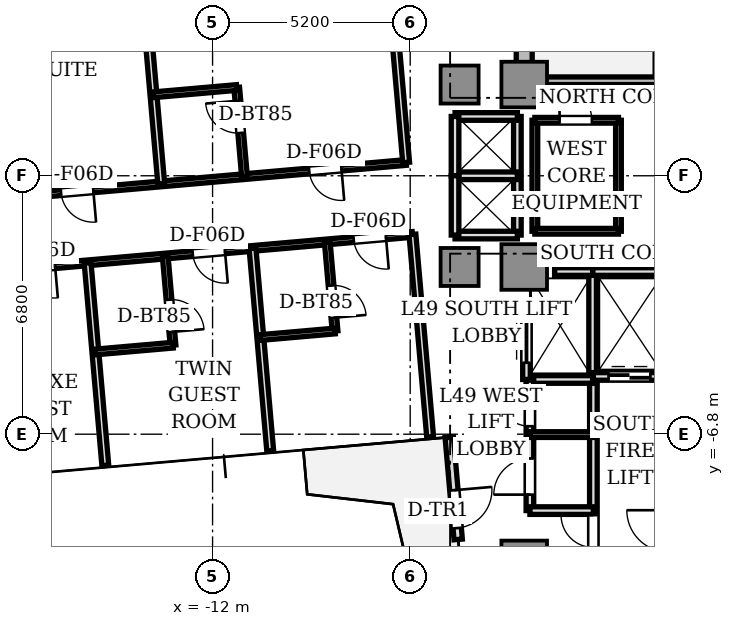
"""IFC4 building model, lengths in metres.
Left out: names, types, materials, properties, quantities, classifications, styles, units other than length and angle.
Written with IfcOpenShell. Run it as: python <this file> out.ifc"""

import sys

from ifc_helpers import new_model, si_unit, direction, frame, frame_2d, origin, origin_2d, place, context, subcontext, project, spatial, rectangle, extrude, source, transform, mapped, element, fill, save


model = new_model("IFC4")
c1 = context("Model", 3, precision=1e-05, world=origin(), true_north=direction((0.0, 1.0)))
c2 = subcontext(c1, "Body", "Model", "MODEL_VIEW")
j1 = project(units=[si_unit("LENGTHUNIT", "METRE"), si_unit("PLANEANGLEUNIT", "RADIAN")], contexts=[c1])
p1 = place(None, origin())
s1 = spatial("IfcSite", under=j1, at=p1, CompositionType="ELEMENT")
p2 = place(p1, origin())
s2 = spatial("IfcBuilding", under=s1, at=p2, CompositionType="ELEMENT")
p3 = place(p2, frame((0.0, 0.0, 178.55)))
s3 = spatial("IfcBuildingStorey", under=s2, at=p3, CompositionType="ELEMENT", Elevation=178.55)
p4 = place(p3, frame((-3.8, 2.85, 0.0), z_axis=(0.0, 0.0, 1.0), x_axis=(0.0, 1.0, 0.0)))
e1 = element("IfcWall", 1, at=p4, inside=s3, PredefinedType="SHEAR", context=c2, shape_type="SweptSolid", body=[
    extrude(rectangle(XDim=6.9, YDim=0.42, at=frame_2d((3.45, 0.0))), origin(), (0.0, 0.0, 1.0), 3.11),
])
m1 = source(origin(), c2, "Body", "SweptSolid", [
    extrude(rectangle(XDim=1.2, YDim=1.2, at=origin_2d()), origin(), (0.0, 0.0, 1.0), 3.11),
])
for number, where, z_axis, x_axis in (
    (2, (-3.8, 2.4, 0.0), (0.0, 0.0, 1.0), (1.0, 0.0, 0.0)),
    (3, (-3.8, -2.4, 0.0), (0.0, 0.0, 1.0), (1.0, 0.0, 0.0)),
    (4, (-3.8, -10.2, 0.0), (0.0, 0.0, 1.0), (1.0, 0.0, 0.0)),
):
    element("IfcColumn", number, at=place(p3, frame(where, z_axis=z_axis, x_axis=x_axis)), inside=s3, PredefinedType="COLUMN", context=c2, shape_type="MappedRepresentation", body=[
        mapped(m1, transform((0.0, 0.0, 0.0), scale=1.0)),
    ])
m2 = source(origin(), c2, "Body", "SweptSolid", [
    extrude(rectangle(XDim=1.0, YDim=1.0, at=origin_2d()), origin(), (0.0, 0.0, 1.0), 3.11),
])
for number, where, z_axis, x_axis in (
    (5, (-5.5, 2.4, 0.0), (0.0, 0.0, 1.0), (1.0, 0.0, 0.0)),
    (6, (-5.5, -2.4, 0.0), (0.0, 0.0, 1.0), (1.0, 0.0, 0.0)),
):
    element("IfcColumn", number, at=place(p3, frame(where, z_axis=z_axis, x_axis=x_axis)), inside=s3, PredefinedType="COLUMN", context=c2, shape_type="MappedRepresentation", body=[
        mapped(m2, transform((0.0, 0.0, 0.0), scale=1.0)),
    ])
p5 = place(p3, frame((-5.772, -6.879, 0.0), z_axis=(0.0, 0.0, 1.0), x_axis=(0.087168071984, -0.996193619346, 0.0)))
e7 = element("IfcWall", 7, at=p5, inside=s3, PredefinedType="STANDARD", context=c2, shape_type="SweptSolid", body=[
    extrude(rectangle(XDim=2.7, YDim=0.22, at=frame_2d((1.35, 0.0))), origin(), (0.0, 0.0, 1.0), 3.11),
])
p6 = place(p5, frame((1.4, 0.0, 0.0)))
e8 = element("IfcOpeningElement", 8, at=p6, cuts=e7, PredefinedType="OPENING", context=c2, shape_type="SweptSolid", body=[
    extrude(rectangle(XDim=1.0, YDim=2.2, at=frame_2d((0.5, 1.1))), frame((0.0, 0.12, 0.0), z_axis=(0.0, -1.0, 0.0), x_axis=(1.0, 0.0, 0.0)), (0.0, 0.0, 1.0), 0.24),
])
p7 = place(p3, frame((-3.72, 2.5, 0.0), z_axis=(0.0, 0.0, 1.0), x_axis=(1.0, 0.0, 0.0)))
e9 = element("IfcWall", 9, at=p7, inside=s3, PredefinedType="SOLIDWALL", context=c2, shape_type="SweptSolid", body=[
    extrude(rectangle(XDim=3.72, YDim=0.2, at=frame_2d((1.86, 0.0))), origin(), (0.0, 0.0, 1.0), 3.11),
])
p8 = place(p3, frame((-1.98, -9.98, 0.0), z_axis=(0.0, 0.0, 1.0), x_axis=(0.0, 1.0, 0.0)))
e10 = element("IfcWall", 10, at=p8, inside=s3, PredefinedType="SOLIDWALL", context=c2, shape_type="SweptSolid", body=[
    extrude(rectangle(XDim=4.66, YDim=0.2, at=frame_2d((2.33, 0.0))), origin(), (0.0, 0.0, 1.0), 2.66),
])
p9 = place(p8, frame((0.2, 0.0, 0.0)))
e11 = element("IfcOpeningElement", 11, at=p9, cuts=e10, PredefinedType="OPENING", context=c2, shape_type="SweptSolid", body=[
    extrude(rectangle(XDim=0.85, YDim=2.1, at=frame_2d((0.425, 1.05))), frame((0.0, 0.11, 0.0), z_axis=(0.0, -1.0, 0.0), x_axis=(1.0, 0.0, 0.0)), (0.0, 0.0, 1.0), 0.22),
])
p10 = place(p3, frame((-2.0, -5.28, 0.0), z_axis=(0.0, 0.0, 1.0), x_axis=(0.0, 1.0, 0.0)))
e12 = element("IfcWall", 12, at=p10, inside=s3, PredefinedType="SOLIDWALL", context=c2, shape_type="SweptSolid", body=[
    extrude(rectangle(XDim=2.78, YDim=0.2, at=frame_2d((1.39, 0.0))), origin(), (0.0, 0.0, 1.0), 2.66),
])
p11 = place(p3, frame((-2.0, -2.52, 0.0), z_axis=(0.0, 0.0, 1.0), x_axis=(1.0, 0.0, 0.0)))
e13 = element("IfcWall", 13, at=p11, inside=s3, PredefinedType="SOLIDWALL", context=c2, shape_type="SweptSolid", body=[
    extrude(rectangle(XDim=1.95, YDim=0.2, at=frame_2d((0.975, 0.0))), origin(), (0.0, 0.0, 1.0), 2.66),
])
p12 = place(p3, frame((-1.98, -5.28, 0.0), z_axis=(0.0, 0.0, 1.0), x_axis=(1.0, 0.0, 0.0)))
e14 = element("IfcWall", 14, at=p12, inside=s3, PredefinedType="SOLIDWALL", context=c2, shape_type="SweptSolid", body=[
    extrude(rectangle(XDim=1.93, YDim=0.2, at=frame_2d((0.965, 0.0))), origin(), (0.0, 0.0, 1.0), 2.66),
])
p13 = place(p12, frame((0.4, 0.0, 0.0)))
e15 = element("IfcOpeningElement", 15, at=p13, cuts=e14, PredefinedType="OPENING", context=c2, shape_type="SweptSolid", body=[
    extrude(rectangle(XDim=1.1, YDim=2.2, at=frame_2d((0.55, 1.1))), frame((0.0, 0.11, 0.0), z_axis=(0.0, -1.0, 0.0), x_axis=(1.0, 0.0, 0.0)), (0.0, 0.0, 1.0), 0.22),
])
p14 = place(p3, frame((-3.0, -2.52, 0.0), z_axis=(0.0, 0.0, 1.0), x_axis=(1.0, 0.0, 0.0)))
e16 = element("IfcWall", 16, at=p14, inside=s3, PredefinedType="SOLIDWALL", context=c2, shape_type="SweptSolid", body=[
    extrude(rectangle(XDim=1.0, YDim=0.2, at=frame_2d((0.5, 0.0))), origin(), (0.0, 0.0, 1.0), 2.66),
])
p15 = place(p3, frame((-3.74, -5.36, 0.0), z_axis=(0.0, 0.0, 1.0), x_axis=(1.0, 0.0, 0.0)))
e17 = element("IfcWall", 17, at=p15, inside=s3, PredefinedType="SOLIDWALL", context=c2, shape_type="SweptSolid", body=[
    extrude(rectangle(XDim=1.74, YDim=0.2, at=frame_2d((0.87, 0.0))), origin(), (0.0, 0.0, 1.0), 2.66),
])
p16 = place(p3, frame((-3.74, -5.36, 0.0), z_axis=(0.0, 0.0, 1.0), x_axis=(0.0, 1.0, 0.0)))
e18 = element("IfcWall", 18, at=p16, inside=s3, PredefinedType="SOLIDWALL", context=c2, shape_type="SweptSolid", body=[
    extrude(rectangle(XDim=2.08, YDim=0.2, at=frame_2d((1.04, 0.0))), origin(), (0.0, 0.0, 1.0), 2.66),
])
p17 = place(p16, frame((0.44, 0.0, 0.0)))
e19 = element("IfcOpeningElement", 19, at=p17, cuts=e18, PredefinedType="OPENING", context=c2, shape_type="SweptSolid", body=[
    extrude(rectangle(XDim=1.2, YDim=2.2, at=frame_2d((0.6, 1.1))), frame((0.0, 0.11, 0.0), z_axis=(0.0, -1.0, 0.0), x_axis=(1.0, 0.0, 0.0)), (0.0, 0.0, 1.0), 0.22),
])
p18 = place(p3, frame((-3.98, -1.56, 0.0), z_axis=(0.0, 0.0, 1.0), x_axis=(0.0, 1.0, 0.0)))
e20 = element("IfcWall", 20, at=p18, inside=s3, PredefinedType="SOLIDWALL", context=c2, shape_type="SweptSolid", body=[
    extrude(rectangle(XDim=3.12, YDim=0.2, at=frame_2d((1.56, 0.0))), origin(), (0.0, 0.0, 1.0), 2.28),
])
for number, where, z_axis, x_axis in (
    (21, (-5.62, 1.56, 0.0), (0.0, 0.0, 1.0), (1.0, 0.0, 0.0)),
    (22, (-5.62, -1.56, 0.0), (0.0, 0.0, 1.0), (1.0, 0.0, 0.0)),
    (23, (-5.62, 0.0, 0.0), (0.0, 0.0, 1.0), (1.0, 0.0, 0.0)),
):
    element("IfcWall", number, at=place(p3, frame(where, z_axis=z_axis, x_axis=x_axis)), inside=s3, PredefinedType="SOLIDWALL", context=c2, shape_type="SweptSolid", body=[
        extrude(rectangle(XDim=1.64, YDim=0.2, at=frame_2d((0.82, 0.0))), origin(), (0.0, 0.0, 1.0), 2.66),
    ])
for number, where, z_axis, x_axis in (
    (24, (-5.62, 0.0, 0.0), (0.0, 0.0, 1.0), (0.0, 1.0, 0.0)),
    (25, (-5.62, -1.56, 0.0), (0.0, 0.0, 1.0), (0.0, 1.0, 0.0)),
):
    element("IfcWall", number, at=place(p3, frame(where, z_axis=z_axis, x_axis=x_axis)), inside=s3, PredefinedType="SOLIDWALL", context=c2, shape_type="SweptSolid", body=[
        extrude(rectangle(XDim=1.56, YDim=0.2, at=frame_2d((0.78, 0.0))), origin(), (0.0, 0.0, 1.0), 2.66),
    ])
p19 = place(p3, frame((-3.65, -8.81, 0.0), z_axis=(0.0, 0.0, 1.0), x_axis=(0.0, 1.0, 0.0)))
e26 = element("IfcWall", 26, at=p19, inside=s3, PredefinedType="SOLIDWALL", context=c2, shape_type="SweptSolid", body=[
    extrude(rectangle(XDim=3.43, YDim=0.2, at=frame_2d((1.715, 0.0))), origin(), (0.0, 0.0, 1.0), 2.66),
])
p20 = place(p19, frame((0.42, 0.0, 0.0)))
e27 = element("IfcOpeningElement", 27, at=p20, cuts=e26, PredefinedType="OPENING", context=c2, shape_type="SweptSolid", body=[
    extrude(rectangle(XDim=0.95, YDim=2.15, at=frame_2d((0.475, 1.075))), frame((0.0, 0.11, 0.0), z_axis=(0.0, -1.0, 0.0), x_axis=(1.0, 0.0, 0.0)), (0.0, 0.0, 1.0), 0.22),
])
p21 = place(p19, frame((2.22, 0.0, 0.0)))
e28 = element("IfcOpeningElement", 28, at=p21, cuts=e26, PredefinedType="OPENING", context=c2, shape_type="SweptSolid", body=[
    extrude(rectangle(XDim=0.85, YDim=2.1, at=frame_2d((0.425, 1.05))), frame((0.0, 0.11, 0.0), z_axis=(0.0, -1.0, 0.0), x_axis=(1.0, 0.0, 0.0)), (0.0, 0.0, 1.0), 0.22),
])
p22 = place(p3, frame((-3.65, -8.81, 0.0), z_axis=(0.0, 0.0, 1.0), x_axis=(1.0, 0.0, 0.0)))
e29 = element("IfcWall", 29, at=p22, inside=s3, PredefinedType="SOLIDWALL", context=c2, shape_type="SweptSolid", body=[
    extrude(rectangle(XDim=1.67, YDim=0.2, at=frame_2d((0.835, 0.0))), origin(), (0.0, 0.0, 1.0), 2.66),
])
p23 = place(p3, frame((-3.65, -6.81, 0.0), z_axis=(0.0, 0.0, 1.0), x_axis=(1.0, 0.0, 0.0)))
e30 = element("IfcWall", 30, at=p23, inside=s3, PredefinedType="PARTITIONING", context=c2, shape_type="SweptSolid", body=[
    extrude(rectangle(XDim=1.67, YDim=0.15, at=frame_2d((0.835, 0.0))), origin(), (0.0, 0.0, 1.0), 2.66),
])
p24 = place(p3, frame((-1.32, -1.46, 0.0), z_axis=(0.0, 0.0, 1.0), x_axis=(0.0, 1.0, 0.0)))
e31 = element("IfcWall", 31, at=p24, inside=s3, PredefinedType="PARTITIONING", context=c2, shape_type="SweptSolid", body=[
    extrude(rectangle(XDim=2.92, YDim=0.15, at=frame_2d((1.46, 0.0))), origin(), (0.0, 0.0, 1.0), 2.66),
])
p25 = place(p3, frame((-3.52, -1.46, 0.0), z_axis=(0.0, 0.0, 1.0), x_axis=(0.0, 1.0, 0.0)))
e32 = element("IfcWall", 32, at=p25, inside=s3, PredefinedType="PARTITIONING", context=c2, shape_type="SweptSolid", body=[
    extrude(rectangle(XDim=2.92, YDim=0.15, at=frame_2d((1.46, 0.0))), origin(), (0.0, 0.0, 1.0), 2.28),
])
p26 = place(p3, frame((-3.52, 1.46, 0.0), z_axis=(0.0, 0.0, 1.0), x_axis=(1.0, 0.0, 0.0)))
e33 = element("IfcWall", 33, at=p26, inside=s3, PredefinedType="PARTITIONING", context=c2, shape_type="SweptSolid", body=[
    extrude(rectangle(XDim=2.2, YDim=0.15, at=frame_2d((1.1, 0.0))), origin(), (0.0, 0.0, 1.0), 2.66),
])
p27 = place(p26, frame((0.65, 0.0, 0.0)))
e34 = element("IfcOpeningElement", 34, at=p27, cuts=e33, PredefinedType="OPENING", context=c2, shape_type="SweptSolid", body=[
    extrude(rectangle(XDim=0.85, YDim=2.1, at=frame_2d((0.425, 1.05))), frame((0.0, 0.085, 0.0), z_axis=(0.0, -1.0, 0.0), x_axis=(1.0, 0.0, 0.0)), (0.0, 0.0, 1.0), 0.17),
])
p28 = place(p3, frame((-3.52, -1.46, 0.0), z_axis=(0.0, 0.0, 1.0), x_axis=(1.0, 0.0, 0.0)))
e35 = element("IfcWall", 35, at=p28, inside=s3, PredefinedType="PARTITIONING", context=c2, shape_type="SweptSolid", body=[
    extrude(rectangle(XDim=2.2, YDim=0.15, at=frame_2d((1.1, 0.0))), origin(), (0.0, 0.0, 1.0), 2.66),
])
p29 = place(p3, frame((-6.741, -1.543, 0.0), z_axis=(0.0, 0.0, 1.0), x_axis=(-0.996195062465, -0.087151577845, 0.0)))
e36 = element("IfcWall", 36, at=p29, inside=s3, PredefinedType="PARTITIONING", context=c2, shape_type="SweptSolid", body=[
    extrude(rectangle(XDim=13.2, YDim=0.15, at=frame_2d((6.6, 0.0))), origin(), (0.0, 0.0, 1.0), 2.66),
])
p30 = place(p29, frame((0.7, 0.0, 0.0)))
e37 = element("IfcOpeningElement", 37, at=p30, cuts=e36, PredefinedType="OPENING", context=c2, shape_type="SweptSolid", body=[
    extrude(rectangle(XDim=0.85, YDim=2.1, at=frame_2d((0.425, 1.05))), frame((0.0, 0.085, 0.0), z_axis=(0.0, -1.0, 0.0), x_axis=(1.0, 0.0, 0.0)), (0.0, 0.0, 1.0), 0.17),
])
p31 = place(p29, frame((4.952, 0.0, 0.0)))
e38 = element("IfcOpeningElement", 38, at=p31, cuts=e36, PredefinedType="OPENING", context=c2, shape_type="SweptSolid", body=[
    extrude(rectangle(XDim=0.85, YDim=2.1, at=frame_2d((0.425, 1.05))), frame((0.0, 0.085, 0.0), z_axis=(0.0, -1.0, 0.0), x_axis=(1.0, 0.0, 0.0)), (0.0, 0.0, 1.0), 0.17),
])
p32 = place(p29, frame((9.44, 0.0, 0.0)))
e39 = element("IfcOpeningElement", 39, at=p32, cuts=e36, PredefinedType="OPENING", context=c2, shape_type="SweptSolid", body=[
    extrude(rectangle(XDim=0.85, YDim=2.1, at=frame_2d((0.425, 1.05))), frame((0.0, 0.085, 0.0), z_axis=(0.0, -1.0, 0.0), x_axis=(1.0, 0.0, 0.0)), (0.0, 0.0, 1.0), 0.17),
])
p33 = place(p3, frame((-6.907, 0.349, 0.0), z_axis=(0.0, 0.0, 1.0), x_axis=(-0.996195062465, -0.087151577845, 0.0)))
e40 = element("IfcWall", 40, at=p33, inside=s3, PredefinedType="PARTITIONING", context=c2, shape_type="SweptSolid", body=[
    extrude(rectangle(XDim=13.2, YDim=0.15, at=frame_2d((6.6, 0.0))), origin(), (0.0, 0.0, 1.0), 2.66),
])
p34 = place(p33, frame((1.71, 0.0, 0.0)))
e41 = element("IfcOpeningElement", 41, at=p34, cuts=e40, PredefinedType="OPENING", context=c2, shape_type="SweptSolid", body=[
    extrude(rectangle(XDim=0.85, YDim=2.1, at=frame_2d((0.425, 1.05))), frame((0.0, 0.085, 0.0), z_axis=(0.0, -1.0, 0.0), x_axis=(1.0, 0.0, 0.0)), (0.0, 0.0, 1.0), 0.17),
])
p35 = place(p33, frame((8.264, 0.0, 0.0)))
e42 = element("IfcOpeningElement", 42, at=p35, cuts=e40, PredefinedType="OPENING", context=c2, shape_type="SweptSolid", body=[
    extrude(rectangle(XDim=0.85, YDim=2.1, at=frame_2d((0.425, 1.05))), frame((0.0, 0.085, 0.0), z_axis=(0.0, -1.0, 0.0), x_axis=(1.0, 0.0, 0.0)), (0.0, 0.0, 1.0), 0.17),
])
for number, where, z_axis, x_axis in (
    (43, (-6.741, -1.543, 0.0), (0.0, 0.0, 1.0), (0.087, -0.996, 0.0)),
    (44, (-7.373, 5.679, 0.0), (0.0, 0.0, 1.0), (0.087, -0.996, 0.0)),
    (45, (-10.949, -1.912, 0.0), (0.0, 0.0, 1.0), (0.087, -0.996, 0.0)),
):
    element("IfcWall", number, at=place(p3, frame(where, z_axis=z_axis, x_axis=x_axis)), inside=s3, PredefinedType="PARTITIONING", context=c2, shape_type="SweptSolid", body=[
        extrude(rectangle(XDim=5.35, YDim=0.18, at=frame_2d((2.675, 0.0))), origin(), (0.0, 0.0, 1.0), 2.66),
    ])
p36 = place(p3, frame((-8.983, -1.74, 0.0), z_axis=(0.0, 0.0, 1.0), x_axis=(0.087224846905, -0.996188649846, 0.0)))
e46 = element("IfcWall", 46, at=p36, inside=s3, PredefinedType="PARTITIONING", context=c2, shape_type="SweptSolid", body=[
    extrude(rectangle(XDim=2.354, YDim=0.15, at=frame_2d((1.177, 0.0))), origin(), (0.0, 0.0, 1.0), 2.66),
])
p37 = place(p36, frame((1.154, 0.0, 0.0)))
e47 = element("IfcOpeningElement", 47, at=p37, cuts=e46, PredefinedType="OPENING", context=c2, shape_type="SweptSolid", body=[
    extrude(rectangle(XDim=0.85, YDim=2.1, at=frame_2d((0.425, 1.05))), frame((0.0, 0.085, 0.0), z_axis=(0.0, -1.0, 0.0), x_axis=(1.0, 0.0, 0.0)), (0.0, 0.0, 1.0), 0.17),
])
p38 = place(p3, frame((-8.777, -4.084, 0.0), z_axis=(0.0, 0.0, 1.0), x_axis=(-0.996191703625, -0.087189962887, 0.0)))
e48 = element("IfcWall", 48, at=p38, inside=s3, PredefinedType="PARTITIONING", context=c2, shape_type="SweptSolid", body=[
    extrude(rectangle(XDim=1.974, YDim=0.15, at=frame_2d((0.987, 0.0))), origin(), (0.0, 0.0, 1.0), 2.66),
])
p39 = place(p3, frame((-15.289, -2.291, 0.0), z_axis=(0.0, 0.0, 1.0), x_axis=(0.087161289348, -0.996194212812, 0.0)))
e49 = element("IfcWall", 49, at=p39, inside=s3, PredefinedType="PARTITIONING", context=c2, shape_type="SweptSolid", body=[
    extrude(rectangle(XDim=5.35, YDim=0.18, at=frame_2d((2.675, 0.0))), origin(), (0.0, 0.0, 1.0), 2.66),
])
p40 = place(p3, frame((-13.246, -2.113, 0.0), z_axis=(0.0, 0.0, 1.0), x_axis=(0.087224846905, -0.996188649846, 0.0)))
e50 = element("IfcWall", 50, at=p40, inside=s3, PredefinedType="PARTITIONING", context=c2, shape_type="SweptSolid", body=[
    extrude(rectangle(XDim=2.354, YDim=0.15, at=frame_2d((1.177, 0.0))), origin(), (0.0, 0.0, 1.0), 2.66),
])
p41 = place(p40, frame((1.154, 0.0, 0.0)))
e51 = element("IfcOpeningElement", 51, at=p41, cuts=e50, PredefinedType="OPENING", context=c2, shape_type="SweptSolid", body=[
    extrude(rectangle(XDim=0.85, YDim=2.1, at=frame_2d((0.425, 1.05))), frame((0.0, 0.085, 0.0), z_axis=(0.0, -1.0, 0.0), x_axis=(1.0, 0.0, 0.0)), (0.0, 0.0, 1.0), 0.17),
])
p42 = place(p3, frame((-13.041, -4.458, 0.0), z_axis=(0.0, 0.0, 1.0), x_axis=(-0.99619307114, -0.087174336889, 0.0)))
e52 = element("IfcWall", 52, at=p42, inside=s3, PredefinedType="PARTITIONING", context=c2, shape_type="SweptSolid", body=[
    extrude(rectangle(XDim=2.05, YDim=0.15, at=frame_2d((1.025, 0.0))), origin(), (0.0, 0.0, 1.0), 2.66),
])
p43 = place(p3, frame((-13.35, -0.214, 0.0), z_axis=(0.0, 0.0, 1.0), x_axis=(-0.087161289348, 0.996194212812, 0.0)))
e53 = element("IfcWall", 53, at=p43, inside=s3, PredefinedType="PARTITIONING", context=c2, shape_type="SweptSolid", body=[
    extrude(rectangle(XDim=5.35, YDim=0.18, at=frame_2d((2.675, 0.0))), origin(), (0.0, 0.0, 1.0), 2.66),
])
p44 = place(p3, frame((-11.159, -0.023, 0.0), z_axis=(0.0, 0.0, 1.0), x_axis=(-0.087224846905, 0.996188649846, 0.0)))
e54 = element("IfcWall", 54, at=p44, inside=s3, PredefinedType="PARTITIONING", context=c2, shape_type="SweptSolid", body=[
    extrude(rectangle(XDim=2.354, YDim=0.15, at=frame_2d((1.177, 0.0))), origin(), (0.0, 0.0, 1.0), 2.66),
])
p45 = place(p44, frame((1.154, 0.0, 0.0)))
e55 = element("IfcOpeningElement", 55, at=p45, cuts=e54, PredefinedType="OPENING", context=c2, shape_type="SweptSolid", body=[
    extrude(rectangle(XDim=0.85, YDim=2.1, at=frame_2d((0.425, 1.05))), frame((0.0, 0.085, 0.0), z_axis=(0.0, -1.0, 0.0), x_axis=(1.0, 0.0, 0.0)), (0.0, 0.0, 1.0), 0.17),
])
p46 = place(p3, frame((-11.365, 2.322, 0.0), z_axis=(0.0, 0.0, 1.0), x_axis=(-0.996195042958, -0.087151800816, 0.0)))
e56 = element("IfcWall", 56, at=p46, inside=s3, PredefinedType="PARTITIONING", context=c2, shape_type="SweptSolid", body=[
    extrude(rectangle(XDim=2.199, YDim=0.15, at=frame_2d((1.1, 0.0))), origin(), (0.0, 0.0, 1.0), 2.66),
])
m3 = source(origin(), c2, "Body", "SweptSolid", [
    extrude(rectangle(XDim=1.0, YDim=0.05, at=origin_2d()), origin(), (0.0, 0.0, 1.0), 2.2),
])
p47 = place(p6, frame((0.5, 0.0, 0.0)))
e57 = element("IfcDoor", 57, at=p47, inside=s3, OperationType="SINGLE_SWING_LEFT", PredefinedType="DOOR", context=c2, shape_type="MappedRepresentation", body=[
    mapped(m3, transform((0.0, 0.0, 0.0), scale=1.0)),
])
fill(e8, e57)
m4 = source(origin(), c2, "Body", "SweptSolid", [
    extrude(rectangle(XDim=0.85, YDim=0.05, at=origin_2d()), origin(), (0.0, 0.0, 1.0), 2.1),
])
p48 = place(p9, frame((0.425, 0.0, 0.0)))
e58 = element("IfcDoor", 58, at=p48, inside=s3, OperationType="SINGLE_SWING_RIGHT", PredefinedType="DOOR", context=c2, shape_type="MappedRepresentation", body=[
    mapped(m4, transform((0.0, 0.0, 0.0), scale=1.0)),
])
fill(e11, e58)
m5 = source(origin(), c2, "Body", "SweptSolid", [
    extrude(rectangle(XDim=1.1, YDim=0.05, at=origin_2d()), origin(), (0.0, 0.0, 1.0), 2.2),
])
p49 = place(p13, frame((0.55, 0.0, 0.0)))
e59 = element("IfcDoor", 59, at=p49, inside=s3, OperationType="DOUBLE_DOOR_SLIDING", PredefinedType="DOOR", context=c2, shape_type="MappedRepresentation", body=[
    mapped(m5, transform((0.0, 0.0, 0.0), scale=1.0)),
])
fill(e15, e59)
m6 = source(origin(), c2, "Body", "SweptSolid", [
    extrude(rectangle(XDim=1.2, YDim=0.05, at=origin_2d()), origin(), (0.0, 0.0, 1.0), 2.2),
])
p50 = place(p17, frame((0.6, 0.0, 0.0)))
e60 = element("IfcDoor", 60, at=p50, inside=s3, OperationType="DOUBLE_DOOR_SLIDING", PredefinedType="DOOR", context=c2, shape_type="MappedRepresentation", body=[
    mapped(m6, transform((0.0, 0.0, 0.0), scale=1.0)),
])
fill(e19, e60)
m7 = source(origin(), c2, "Body", "SweptSolid", [
    extrude(rectangle(XDim=0.95, YDim=0.05, at=origin_2d()), origin(), (0.0, 0.0, 1.0), 2.15),
])
p51 = place(p20, frame((0.475, 0.0, 0.0)))
e61 = element("IfcDoor", 61, at=p51, inside=s3, OperationType="SINGLE_SWING_LEFT", PredefinedType="DOOR", context=c2, shape_type="MappedRepresentation", body=[
    mapped(m7, transform((0.0, 0.0, 0.0), scale=1.0)),
])
fill(e27, e61)
p52 = place(p21, frame((0.425, 0.0, 0.0)))
e62 = element("IfcDoor", 62, at=p52, inside=s3, OperationType="SINGLE_SWING_RIGHT", PredefinedType="DOOR", context=c2, shape_type="MappedRepresentation", body=[
    mapped(m4, transform((0.0, 0.0, 0.0), scale=1.0)),
])
fill(e28, e62)
p53 = place(p27, frame((0.425, 0.0, 0.0)))
e63 = element("IfcDoor", 63, at=p53, inside=s3, OperationType="SINGLE_SWING_LEFT", PredefinedType="DOOR", context=c2, shape_type="MappedRepresentation", body=[
    mapped(m4, transform((0.0, 0.0, 0.0), scale=1.0)),
])
fill(e34, e63)
p54 = place(p37, frame((0.425, 0.0, 0.0)))
e64 = element("IfcDoor", 64, at=p54, inside=s3, OperationType="SINGLE_SWING_RIGHT", PredefinedType="DOOR", context=c2, shape_type="MappedRepresentation", body=[
    mapped(m4, transform((0.0, 0.0, 0.0), scale=1.0)),
])
fill(e47, e64)
p55 = place(p30, frame((0.425, 0.0, 0.0)))
e65 = element("IfcDoor", 65, at=p55, inside=s3, OperationType="SINGLE_SWING_LEFT", PredefinedType="DOOR", context=c2, shape_type="MappedRepresentation", body=[
    mapped(m4, transform((0.0, 0.0, 0.0), scale=1.0)),
])
fill(e37, e65)
p56 = place(p41, frame((0.425, 0.0, 0.0)))
e66 = element("IfcDoor", 66, at=p56, inside=s3, OperationType="SINGLE_SWING_RIGHT", PredefinedType="DOOR", context=c2, shape_type="MappedRepresentation", body=[
    mapped(m4, transform((0.0, 0.0, 0.0), scale=1.0)),
])
fill(e51, e66)
p57 = place(p31, frame((0.425, 0.0, 0.0)))
e67 = element("IfcDoor", 67, at=p57, inside=s3, OperationType="SINGLE_SWING_LEFT", PredefinedType="DOOR", context=c2, shape_type="MappedRepresentation", body=[
    mapped(m4, transform((0.0, 0.0, 0.0), scale=1.0)),
])
fill(e38, e67)
p58 = place(p32, frame((0.425, 0.0, 0.0)))
e68 = element("IfcDoor", 68, at=p58, inside=s3, OperationType="SINGLE_SWING_LEFT", PredefinedType="DOOR", context=c2, shape_type="MappedRepresentation", body=[
    mapped(m4, transform((0.0, 0.0, 0.0), scale=1.0)),
])
fill(e39, e68)
p59 = place(p45, frame((0.425, 0.0, 0.0)))
e69 = element("IfcDoor", 69, at=p59, inside=s3, OperationType="SINGLE_SWING_RIGHT", PredefinedType="DOOR", context=c2, shape_type="MappedRepresentation", body=[
    mapped(m4, transform((0.0, 0.0, 0.0), scale=1.0)),
])
fill(e55, e69)
p60 = place(p34, frame((0.425, 0.0, 0.0)))
e70 = element("IfcDoor", 70, at=p60, inside=s3, OperationType="SINGLE_SWING_LEFT", PredefinedType="DOOR", context=c2, shape_type="MappedRepresentation", body=[
    mapped(m4, transform((0.0, 0.0, 0.0), scale=1.0)),
])
fill(e41, e70)
p61 = place(p35, frame((0.425, 0.0, 0.0)))
e71 = element("IfcDoor", 71, at=p61, inside=s3, OperationType="SINGLE_SWING_LEFT", PredefinedType="DOOR", context=c2, shape_type="MappedRepresentation", body=[
    mapped(m4, transform((0.0, 0.0, 0.0), scale=1.0)),
])
fill(e42, e71)
save(model, sys.argv[1])
